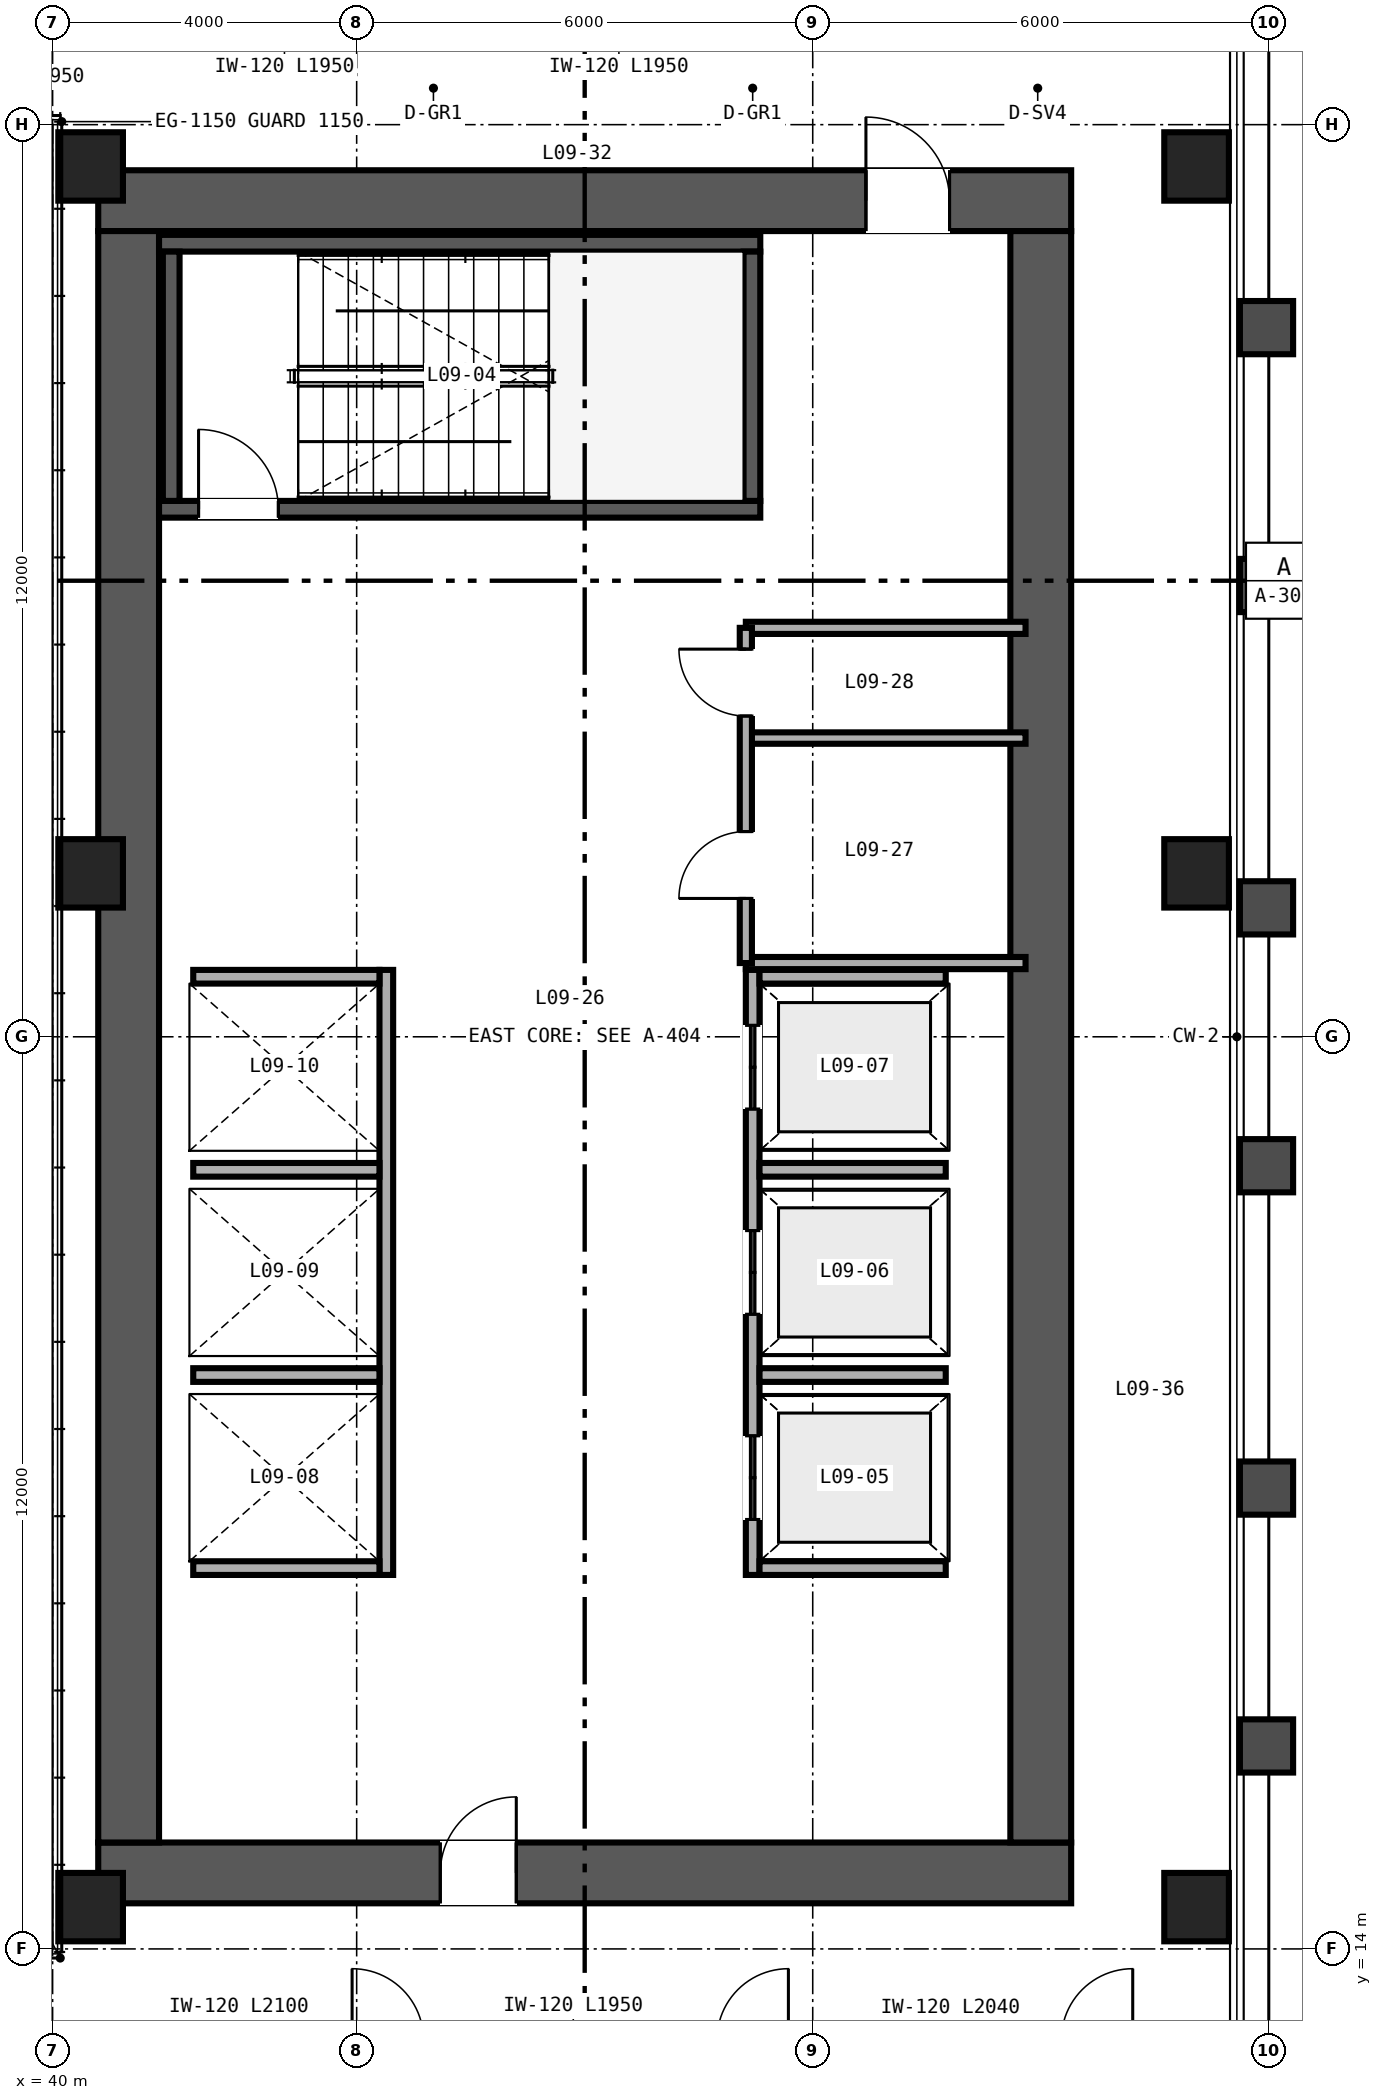
"""IFC4 building model, lengths in metres.
Left out: names, types, materials, properties, quantities, classifications, styles, units other than length and angle.
Written with IfcOpenShell. Run it as: python <this file> out.ifc"""

import sys

from ifc_helpers import new_model, si_unit, direction, frame, frame_2d, origin, origin_2d, place, context, subcontext, project, spatial, rectangle, hollow_rectangle, extrude, source, transform, mapped, element, fill, save


model = new_model("IFC4")
c1 = context("Model", 3, precision=1e-05, world=origin(), true_north=direction((0.0, 1.0)))
c2 = subcontext(c1, "Body", "Model", "MODEL_VIEW")
j1 = project(units=[si_unit("LENGTHUNIT", "METRE"), si_unit("PLANEANGLEUNIT", "RADIAN")], contexts=[c1])
p1 = place(None, origin())
s1 = spatial("IfcSite", under=j1, at=p1, CompositionType="ELEMENT")
p2 = place(p1, origin())
s2 = spatial("IfcBuilding", under=s1, at=p2, CompositionType="ELEMENT")
p3 = place(p2, frame((0.0, 0.0, 42.0)))
s3 = spatial("IfcBuildingStorey", under=s2, at=p3, CompositionType="ELEMENT", Elevation=42.0)
p4 = place(p3, frame((40.6, 15.0, 0.0), z_axis=(0.0, 0.0, 1.0), x_axis=(1.0, 0.0, 0.0)))
e1 = element("IfcWall", 1, at=p4, inside=s3, PredefinedType="SHEAR", context=c2, shape_type="SweptSolid", body=[
    extrude(rectangle(XDim=12.8, YDim=0.8, at=frame_2d((6.4, 0.0))), origin(), (0.0, 0.0, 1.0), 3.35),
])
p5 = place(p4, frame((4.5, 0.0, 0.0)))
e2 = element("IfcOpeningElement", 2, at=p5, cuts=e1, PredefinedType="OPENING", context=c2, shape_type="SweptSolid", body=[
    extrude(rectangle(XDim=1.0, YDim=2.15, at=frame_2d((0.5, 1.075))), frame((0.0, 0.41, 0.0), z_axis=(0.0, -1.0, 0.0), x_axis=(1.0, 0.0, 0.0)), (0.0, 0.0, 1.0), 0.82),
])
p6 = place(p3, frame((40.6, 37.0, 0.0), z_axis=(0.0, 0.0, 1.0), x_axis=(1.0, 0.0, 0.0)))
e3 = element("IfcWall", 3, at=p6, inside=s3, PredefinedType="SHEAR", context=c2, shape_type="SweptSolid", body=[
    extrude(rectangle(XDim=12.8, YDim=0.8, at=frame_2d((6.4, 0.0))), origin(), (0.0, 0.0, 1.0), 3.35),
])
p7 = place(p6, frame((10.1, 0.0, 0.0)))
e4 = element("IfcOpeningElement", 4, at=p7, cuts=e3, PredefinedType="OPENING", context=c2, shape_type="SweptSolid", body=[
    extrude(rectangle(XDim=1.1, YDim=2.15, at=frame_2d((0.55, 1.075))), frame((0.0, 0.41, 0.0), z_axis=(0.0, -1.0, 0.0), x_axis=(1.0, 0.0, 0.0)), (0.0, 0.0, 1.0), 0.82),
])
for number, where, z_axis, x_axis in (
    (5, (41.0, 15.4, 0.0), (0.0, 0.0, 1.0), (0.0, 1.0, 0.0)),
    (6, (53.0, 15.4, 0.0), (0.0, 0.0, 1.0), (0.0, 1.0, 0.0)),
):
    element("IfcWall", number, at=place(p3, frame(where, z_axis=z_axis, x_axis=x_axis)), inside=s3, PredefinedType="SHEAR", context=c2, shape_type="SweptSolid", body=[
        extrude(rectangle(XDim=21.2, YDim=0.8, at=frame_2d((10.6, 0.0))), origin(), (0.0, 0.0, 1.0), 3.35),
    ])
p8 = place(p3, frame((41.4, 32.94, 0.0), z_axis=(0.0, 0.0, 1.0), x_axis=(1.0, 0.0, 0.0)))
e7 = element("IfcWall", 7, at=p8, inside=s3, PredefinedType="SHEAR", context=c2, shape_type="SweptSolid", body=[
    extrude(rectangle(XDim=7.91, YDim=0.22, at=frame_2d((3.955, 0.0))), origin(), (0.0, 0.0, 1.0), 3.4),
])
p9 = place(p8, frame((0.52, 0.0, 0.0)))
e8 = element("IfcOpeningElement", 8, at=p9, cuts=e7, PredefinedType="OPENING", context=c2, shape_type="SweptSolid", body=[
    extrude(rectangle(XDim=1.05, YDim=2.15, at=frame_2d((0.525, 1.075))), frame((0.0, 0.12, 0.0), z_axis=(0.0, -1.0, 0.0), x_axis=(1.0, 0.0, 0.0)), (0.0, 0.0, 1.0), 0.24),
])
p10 = place(p3, frame((41.4, 36.44, 0.0), z_axis=(0.0, 0.0, 1.0), x_axis=(1.0, 0.0, 0.0)))
e9 = element("IfcWall", 9, at=p10, inside=s3, PredefinedType="SHEAR", context=c2, shape_type="SweptSolid", body=[
    extrude(rectangle(XDim=7.91, YDim=0.22, at=frame_2d((3.955, 0.0))), origin(), (0.0, 0.0, 1.0), 3.4),
])
for number, where, z_axis, x_axis in (
    (10, (41.56, 33.05, 0.0), (0.0, 0.0, 1.0), (0.0, 1.0, 0.0)),
    (11, (49.2, 33.05, 0.0), (0.0, 0.0, 1.0), (0.0, 1.0, 0.0)),
):
    element("IfcWall", number, at=place(p3, frame(where, z_axis=z_axis, x_axis=x_axis)), inside=s3, PredefinedType="SHEAR", context=c2, shape_type="SweptSolid", body=[
        extrude(rectangle(XDim=3.28, YDim=0.22, at=frame_2d((1.64, 0.0))), origin(), (0.0, 0.0, 1.0), 3.4),
    ])
m1 = source(origin(), c2, "Body", "SweptSolid", [
    extrude(hollow_rectangle(XDim=0.85, YDim=0.9, WallThickness=0.04, at=origin_2d()), origin(), (0.0, 0.0, 1.0), 3.35),
])
for number, where, z_axis, x_axis in (
    (12, (40.5, 14.55, 0.0), (0.0, 0.0, 1.0), (1.0, 0.0, 0.0)),
    (13, (55.05, 14.55, 0.0), (0.0, 0.0, 1.0), (1.0, 0.0, 0.0)),
    (14, (40.5, 28.15, 0.0), (0.0, 0.0, 1.0), (1.0, 0.0, 0.0)),
    (15, (55.05, 28.15, 0.0), (0.0, 0.0, 1.0), (1.0, 0.0, 0.0)),
    (16, (40.5, 37.45, 0.0), (0.0, 0.0, 1.0), (1.0, 0.0, 0.0)),
    (17, (55.05, 37.45, 0.0), (0.0, 0.0, 1.0), (1.0, 0.0, 0.0)),
):
    element("IfcColumn", number, at=place(p3, frame(where, z_axis=z_axis, x_axis=x_axis)), inside=s3, PredefinedType="COLUMN", context=c2, shape_type="MappedRepresentation", body=[
        mapped(m1, transform((0.0, 0.0, 0.0), scale=1.0)),
    ])
p11 = place(p3, frame((49.21, 18.92, 0.0), z_axis=(0.0, 0.0, 1.0), x_axis=(0.0, 1.0, 0.0)))
e18 = element("IfcWall", 18, at=p11, inside=s3, PredefinedType="SOLIDWALL", context=c2, shape_type="SweptSolid", body=[
    extrude(rectangle(XDim=7.96, YDim=0.18, at=frame_2d((3.98, 0.0))), origin(), (0.0, 0.0, 1.0), 3.35),
])
p12 = place(p11, frame((0.73, 0.0, 0.0)))
e19 = element("IfcOpeningElement", 19, at=p12, cuts=e18, PredefinedType="OPENING", context=c2, shape_type="SweptSolid", body=[
    extrude(rectangle(XDim=1.1, YDim=2.2, at=frame_2d((0.55, 1.1))), frame((0.0, 0.1, 0.0), z_axis=(0.0, -1.0, 0.0), x_axis=(1.0, 0.0, 0.0)), (0.0, 0.0, 1.0), 0.2),
])
p13 = place(p11, frame((3.43, 0.0, 0.0)))
e20 = element("IfcOpeningElement", 20, at=p13, cuts=e18, PredefinedType="OPENING", context=c2, shape_type="SweptSolid", body=[
    extrude(rectangle(XDim=1.1, YDim=2.2, at=frame_2d((0.55, 1.1))), frame((0.0, 0.1, 0.0), z_axis=(0.0, -1.0, 0.0), x_axis=(1.0, 0.0, 0.0)), (0.0, 0.0, 1.0), 0.2),
])
p14 = place(p11, frame((6.13, 0.0, 0.0)))
e21 = element("IfcOpeningElement", 21, at=p14, cuts=e18, PredefinedType="OPENING", context=c2, shape_type="SweptSolid", body=[
    extrude(rectangle(XDim=1.1, YDim=2.2, at=frame_2d((0.55, 1.1))), frame((0.0, 0.1, 0.0), z_axis=(0.0, -1.0, 0.0), x_axis=(1.0, 0.0, 0.0)), (0.0, 0.0, 1.0), 0.2),
])
for number, where, z_axis, x_axis in (
    (22, (49.3, 19.01, 0.0), (0.0, 0.0, 1.0), (1.0, 0.0, 0.0)),
    (23, (49.3, 26.79, 0.0), (0.0, 0.0, 1.0), (1.0, 0.0, 0.0)),
    (24, (49.3, 21.55, 0.0), (0.0, 0.0, 1.0), (1.0, 0.0, 0.0)),
    (25, (49.3, 24.25, 0.0), (0.0, 0.0, 1.0), (1.0, 0.0, 0.0)),
):
    element("IfcWall", number, at=place(p3, frame(where, z_axis=z_axis, x_axis=x_axis)), inside=s3, PredefinedType="SOLIDWALL", context=c2, shape_type="SweptSolid", body=[
        extrude(rectangle(XDim=2.45, YDim=0.18, at=frame_2d((1.225, 0.0))), origin(), (0.0, 0.0, 1.0), 3.35),
    ])
p15 = place(p3, frame((44.39, 18.92, 0.0), z_axis=(0.0, 0.0, 1.0), x_axis=(0.0, 1.0, 0.0)))
e26 = element("IfcWall", 26, at=p15, inside=s3, PredefinedType="SOLIDWALL", context=c2, shape_type="SweptSolid", body=[
    extrude(rectangle(XDim=7.96, YDim=0.18, at=frame_2d((3.98, 0.0))), origin(), (0.0, 0.0, 1.0), 3.35),
])
for number, where, z_axis, x_axis in (
    (27, (41.85, 19.01, 0.0), (0.0, 0.0, 1.0), (1.0, 0.0, 0.0)),
    (28, (41.85, 26.79, 0.0), (0.0, 0.0, 1.0), (1.0, 0.0, 0.0)),
    (29, (41.85, 21.55, 0.0), (0.0, 0.0, 1.0), (1.0, 0.0, 0.0)),
    (30, (41.85, 24.25, 0.0), (0.0, 0.0, 1.0), (1.0, 0.0, 0.0)),
):
    element("IfcWall", number, at=place(p3, frame(where, z_axis=z_axis, x_axis=x_axis)), inside=s3, PredefinedType="SOLIDWALL", context=c2, shape_type="SweptSolid", body=[
        extrude(rectangle(XDim=2.45, YDim=0.18, at=frame_2d((1.225, 0.0))), origin(), (0.0, 0.0, 1.0), 3.35),
    ])
p16 = place(p3, frame((49.12, 26.97, 0.0), z_axis=(0.0, 0.0, 1.0), x_axis=(1.0, 0.0, 0.0)))
e31 = element("IfcWall", 31, at=p16, inside=s3, PredefinedType="PARTITIONING", context=c2, shape_type="SweptSolid", body=[
    extrude(rectangle(XDim=3.68, YDim=0.16, at=frame_2d((1.84, 0.0))), origin(), (0.0, 0.0, 1.0), 3.35),
])
p17 = place(p3, frame((49.12, 31.38, 0.0), z_axis=(0.0, 0.0, 1.0), x_axis=(1.0, 0.0, 0.0)))
e32 = element("IfcWall", 32, at=p17, inside=s3, PredefinedType="PARTITIONING", context=c2, shape_type="SweptSolid", body=[
    extrude(rectangle(XDim=3.68, YDim=0.16, at=frame_2d((1.84, 0.0))), origin(), (0.0, 0.0, 1.0), 2.36),
])
p18 = place(p3, frame((49.12, 29.93, 0.0), z_axis=(0.0, 0.0, 1.0), x_axis=(1.0, 0.0, 0.0)))
e33 = element("IfcWall", 33, at=p18, inside=s3, PredefinedType="PARTITIONING", context=c2, shape_type="SweptSolid", body=[
    extrude(rectangle(XDim=3.68, YDim=0.15, at=frame_2d((1.84, 0.0))), origin(), (0.0, 0.0, 1.0), 3.35),
])
p19 = place(p3, frame((49.12, 26.97, 0.0), z_axis=(0.0, 0.0, 1.0), x_axis=(0.0, 1.0, 0.0)))
e34 = element("IfcWall", 34, at=p19, inside=s3, PredefinedType="PARTITIONING", context=c2, shape_type="SweptSolid", body=[
    extrude(rectangle(XDim=4.41, YDim=0.16, at=frame_2d((2.205, 0.0))), origin(), (0.0, 0.0, 1.0), 2.36),
])
p20 = place(p19, frame((0.85, 0.0, 0.0)))
e35 = element("IfcOpeningElement", 35, at=p20, cuts=e34, PredefinedType="OPENING", context=c2, shape_type="SweptSolid", body=[
    extrude(rectangle(XDim=0.88, YDim=2.15, at=frame_2d((0.44, 1.075))), frame((0.0, 0.09, 0.0), z_axis=(0.0, -1.0, 0.0), x_axis=(1.0, 0.0, 0.0)), (0.0, 0.0, 1.0), 0.18),
])
p21 = place(p19, frame((3.25, 0.0, 0.0)))
e36 = element("IfcOpeningElement", 36, at=p21, cuts=e34, PredefinedType="OPENING", context=c2, shape_type="SweptSolid", body=[
    extrude(rectangle(XDim=0.88, YDim=2.15, at=frame_2d((0.44, 1.075))), frame((0.0, 0.09, 0.0), z_axis=(0.0, -1.0, 0.0), x_axis=(1.0, 0.0, 0.0)), (0.0, 0.0, 1.0), 0.18),
])
m2 = source(origin(), c2, "Body", "SweptSolid", [
    extrude(rectangle(XDim=1.05, YDim=2.15, at=frame_2d((0.525, 1.075))), frame((0.0, 0.025, 0.0), z_axis=(0.0, -1.0, 0.0), x_axis=(1.0, 0.0, 0.0)), (0.0, 0.0, 1.0), 0.05),
])
p22 = place(p9, origin())
e37 = element("IfcDoor", 37, at=p22, inside=s3, OperationType="SINGLE_SWING_LEFT", PredefinedType="DOOR", context=c2, shape_type="MappedRepresentation", body=[
    mapped(m2, transform((0.0, 0.0, 0.0), scale=1.0)),
])
fill(e8, e37)
m3 = source(origin(), c2, "Body", "SweptSolid", [
    extrude(rectangle(XDim=1.1, YDim=2.2, at=frame_2d((0.55, 1.1))), frame((0.0, 0.025, 0.0), z_axis=(0.0, -1.0, 0.0), x_axis=(1.0, 0.0, 0.0)), (0.0, 0.0, 1.0), 0.05),
])
p23 = place(p12, origin())
e38 = element("IfcDoor", 38, at=p23, inside=s3, OperationType="DOUBLE_DOOR_SLIDING", PredefinedType="DOOR", context=c2, shape_type="MappedRepresentation", body=[
    mapped(m3, transform((0.0, 0.0, 0.0), scale=1.0)),
])
fill(e19, e38)
p24 = place(p13, origin())
e39 = element("IfcDoor", 39, at=p24, inside=s3, OperationType="DOUBLE_DOOR_SLIDING", PredefinedType="DOOR", context=c2, shape_type="MappedRepresentation", body=[
    mapped(m3, transform((0.0, 0.0, 0.0), scale=1.0)),
])
fill(e20, e39)
p25 = place(p14, origin())
e40 = element("IfcDoor", 40, at=p25, inside=s3, OperationType="DOUBLE_DOOR_SLIDING", PredefinedType="DOOR", context=c2, shape_type="MappedRepresentation", body=[
    mapped(m3, transform((0.0, 0.0, 0.0), scale=1.0)),
])
fill(e21, e40)
m4 = source(origin(), c2, "Body", "SweptSolid", [
    extrude(rectangle(XDim=1.0, YDim=2.15, at=frame_2d((0.5, 1.075))), frame((0.0, 0.025, 0.0), z_axis=(0.0, -1.0, 0.0), x_axis=(1.0, 0.0, 0.0)), (0.0, 0.0, 1.0), 0.05),
])
p26 = place(p5, origin())
e41 = element("IfcDoor", 41, at=p26, inside=s3, OperationType="SINGLE_SWING_RIGHT", PredefinedType="DOOR", context=c2, shape_type="MappedRepresentation", body=[
    mapped(m4, transform((0.0, 0.0, 0.0), scale=1.0)),
])
fill(e2, e41)
m5 = source(origin(), c2, "Body", "SweptSolid", [
    extrude(rectangle(XDim=1.1, YDim=2.15, at=frame_2d((0.55, 1.075))), frame((0.0, 0.025, 0.0), z_axis=(0.0, -1.0, 0.0), x_axis=(1.0, 0.0, 0.0)), (0.0, 0.0, 1.0), 0.05),
])
p27 = place(p7, origin())
e42 = element("IfcDoor", 42, at=p27, inside=s3, OperationType="SINGLE_SWING_LEFT", PredefinedType="DOOR", context=c2, shape_type="MappedRepresentation", body=[
    mapped(m5, transform((0.0, 0.0, 0.0), scale=1.0)),
])
fill(e4, e42)
m6 = source(origin(), c2, "Body", "SweptSolid", [
    extrude(rectangle(XDim=0.88, YDim=2.15, at=frame_2d((0.44, 1.075))), frame((0.0, 0.025, 0.0), z_axis=(0.0, -1.0, 0.0), x_axis=(1.0, 0.0, 0.0)), (0.0, 0.0, 1.0), 0.05),
])
p28 = place(p20, origin())
e43 = element("IfcDoor", 43, at=p28, inside=s3, OperationType="SINGLE_SWING_LEFT", PredefinedType="DOOR", context=c2, shape_type="MappedRepresentation", body=[
    mapped(m6, transform((0.0, 0.0, 0.0), scale=1.0)),
])
fill(e35, e43)
p29 = place(p21, origin())
e44 = element("IfcDoor", 44, at=p29, inside=s3, OperationType="SINGLE_SWING_RIGHT", PredefinedType="DOOR", context=c2, shape_type="MappedRepresentation", body=[
    mapped(m6, transform((0.0, 0.0, 0.0), scale=1.0)),
])
fill(e36, e44)
save(model, sys.argv[1])
